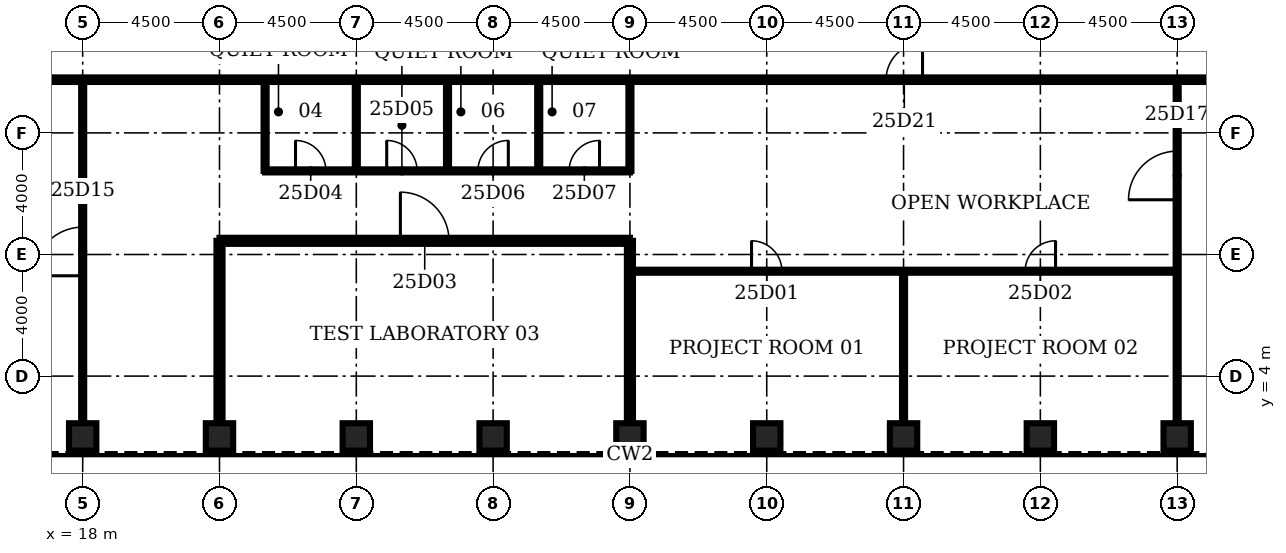
"""IFC4 building model, lengths in metres.
Left out: names, types, materials, properties, quantities, classifications, styles, units other than length and angle.
Written with IfcOpenShell. Run it as: python <this file> out.ifc"""

import sys

from ifc_helpers import new_model, si_unit, direction, frame, frame_2d, origin, origin_2d, place, context, subcontext, project, spatial, rectangle, hollow_rectangle, extrude, element, fill, save


model = new_model("IFC4")
c1 = context("Model", 3, precision=1e-05, world=origin(), true_north=direction((0.0, 1.0)))
c2 = subcontext(c1, "Body", "Model", "MODEL_VIEW")
j1 = project(units=[si_unit("LENGTHUNIT", "METRE"), si_unit("PLANEANGLEUNIT", "RADIAN")], contexts=[c1])
p1 = place(None, origin())
s1 = spatial("IfcSite", under=j1, at=p1, CompositionType="ELEMENT")
p2 = place(p1, origin())
s2 = spatial("IfcBuilding", under=s1, at=p2, CompositionType="ELEMENT")
p3 = place(p2, frame((0.0, 0.0, 117.3)))
s3 = spatial("IfcBuildingStorey", under=s2, at=p3, CompositionType="ELEMENT", Elevation=117.3)
for number, where, z_axis, x_axis in (
    (1, (18.0, 2.0, 0.0), (0.0, 0.0, 1.0), (0.0, 1.0, 0.0)),
    (2, (22.5, 2.0, 0.0), (0.0, 0.0, 1.0), (0.0, 1.0, 0.0)),
    (3, (27.0, 2.0, 0.0), (0.0, 0.0, 1.0), (0.0, 1.0, 0.0)),
    (4, (31.5, 2.0, 0.0), (0.0, 0.0, 1.0), (0.0, 1.0, 0.0)),
    (5, (36.0, 2.0, 0.0), (0.0, 0.0, 1.0), (0.0, 1.0, 0.0)),
    (6, (40.5, 2.0, 0.0), (0.0, 0.0, 1.0), (0.0, 1.0, 0.0)),
    (7, (45.0, 2.0, 0.0), (0.0, 0.0, 1.0), (0.0, 1.0, 0.0)),
    (8, (49.5, 2.0, 0.0), (0.0, 0.0, 1.0), (0.0, 1.0, 0.0)),
    (9, (54.0, 2.0, 0.0), (0.0, 0.0, 1.0), (0.0, 1.0, 0.0)),
):
    element("IfcColumn", number, at=place(p3, frame(where, z_axis=z_axis, x_axis=x_axis)), inside=s3, PredefinedType="COLUMN", context=c2, shape_type="SweptSolid", body=[
        extrude(hollow_rectangle(XDim=0.9, YDim=0.9, WallThickness=0.11, at=origin_2d()), origin(), (0.0, 0.0, 1.0), 4.2),
    ])
p4 = place(p3, frame((36.0, 7.45, 0.0), z_axis=(0.0, 0.0, 1.0), x_axis=(1.0, 0.0, 0.0)))
e10 = element("IfcWall", 10, at=p4, inside=s3, PredefinedType="PARTITIONING", context=c2, shape_type="SweptSolid", body=[
    extrude(rectangle(XDim=18.0, YDim=0.1, at=frame_2d((9.0, 0.0))), origin(), (0.0, 0.0, 1.0), 3.0),
])
p5 = place(p4, frame((4.0, 0.0, 0.0)))
e11 = element("IfcOpeningElement", 11, at=p5, cuts=e10, PredefinedType="OPENING", context=c2, shape_type="SweptSolid", body=[
    extrude(rectangle(XDim=1.0, YDim=2.1, at=frame_2d((0.5, 1.05))), frame((0.0, 0.06, 0.0), z_axis=(0.0, -1.0, 0.0), x_axis=(1.0, 0.0, 0.0)), (0.0, 0.0, 1.0), 0.12),
])
p6 = place(p4, frame((13.0, 0.0, 0.0)))
e12 = element("IfcOpeningElement", 12, at=p6, cuts=e10, PredefinedType="OPENING", context=c2, shape_type="SweptSolid", body=[
    extrude(rectangle(XDim=1.0, YDim=2.1, at=frame_2d((0.5, 1.05))), frame((0.0, 0.06, 0.0), z_axis=(0.0, -1.0, 0.0), x_axis=(1.0, 0.0, 0.0)), (0.0, 0.0, 1.0), 0.12),
])
p7 = place(p3, frame((22.5, 8.45, 0.0), z_axis=(0.0, 0.0, 1.0), x_axis=(1.0, 0.0, 0.0)))
e13 = element("IfcWall", 13, at=p7, inside=s3, PredefinedType="PARTITIONING", context=c2, shape_type="SweptSolid", body=[
    extrude(rectangle(XDim=13.5, YDim=0.2, at=frame_2d((6.75, 0.0))), origin(), (0.0, 0.0, 1.0), 3.0),
])
p8 = place(p7, frame((5.95, 0.0, 0.0)))
e14 = element("IfcOpeningElement", 14, at=p8, cuts=e13, PredefinedType="OPENING", context=c2, shape_type="SweptSolid", body=[
    extrude(rectangle(XDim=1.6, YDim=2.1, at=frame_2d((0.8, 1.05))), frame((0.0, 0.11, 0.0), z_axis=(0.0, -1.0, 0.0), x_axis=(1.0, 0.0, 0.0)), (0.0, 0.0, 1.0), 0.22),
])
p9 = place(p3, frame((24.0, 10.75, 0.0), z_axis=(0.0, 0.0, 1.0), x_axis=(1.0, 0.0, 0.0)))
e15 = element("IfcWall", 15, at=p9, inside=s3, PredefinedType="PARTITIONING", context=c2, shape_type="SweptSolid", body=[
    extrude(rectangle(XDim=12.0, YDim=0.1, at=frame_2d((6.0, 0.0))), origin(), (0.0, 0.0, 1.0), 3.0),
])
p10 = place(p9, frame((1.0, 0.0, 0.0)))
e16 = element("IfcOpeningElement", 16, at=p10, cuts=e15, PredefinedType="OPENING", context=c2, shape_type="SweptSolid", body=[
    extrude(rectangle(XDim=1.0, YDim=2.1, at=frame_2d((0.5, 1.05))), frame((0.0, 0.06, 0.0), z_axis=(0.0, -1.0, 0.0), x_axis=(1.0, 0.0, 0.0)), (0.0, 0.0, 1.0), 0.12),
])
p11 = place(p9, frame((4.0, 0.0, 0.0)))
e17 = element("IfcOpeningElement", 17, at=p11, cuts=e15, PredefinedType="OPENING", context=c2, shape_type="SweptSolid", body=[
    extrude(rectangle(XDim=1.0, YDim=2.1, at=frame_2d((0.5, 1.05))), frame((0.0, 0.06, 0.0), z_axis=(0.0, -1.0, 0.0), x_axis=(1.0, 0.0, 0.0)), (0.0, 0.0, 1.0), 0.12),
])
p12 = place(p9, frame((7.0, 0.0, 0.0)))
e18 = element("IfcOpeningElement", 18, at=p12, cuts=e15, PredefinedType="OPENING", context=c2, shape_type="SweptSolid", body=[
    extrude(rectangle(XDim=1.0, YDim=2.1, at=frame_2d((0.5, 1.05))), frame((0.0, 0.06, 0.0), z_axis=(0.0, -1.0, 0.0), x_axis=(1.0, 0.0, 0.0)), (0.0, 0.0, 1.0), 0.12),
])
p13 = place(p9, frame((10.0, 0.0, 0.0)))
e19 = element("IfcOpeningElement", 19, at=p13, cuts=e15, PredefinedType="OPENING", context=c2, shape_type="SweptSolid", body=[
    extrude(rectangle(XDim=1.0, YDim=2.1, at=frame_2d((0.5, 1.05))), frame((0.0, 0.06, 0.0), z_axis=(0.0, -1.0, 0.0), x_axis=(1.0, 0.0, 0.0)), (0.0, 0.0, 1.0), 0.12),
])
p14 = place(p3, frame((15.15, 13.75, 0.0), z_axis=(0.0, 0.0, 1.0), x_axis=(1.0, 0.0, 0.0)))
e20 = element("IfcWall", 20, at=p14, inside=s3, PredefinedType="PARTITIONING", context=c2, shape_type="SweptSolid", body=[
    extrude(rectangle(XDim=41.7, YDim=0.15, at=frame_2d((20.85, 0.0))), origin(), (0.0, 0.0, 1.0), 3.0),
])
p15 = place(p14, frame((29.275, 0.0, 0.0)))
e21 = element("IfcOpeningElement", 21, at=p15, cuts=e20, PredefinedType="OPENING", context=c2, shape_type="SweptSolid", body=[
    extrude(rectangle(XDim=1.2, YDim=2.1, at=frame_2d((0.6, 1.05))), frame((0.0, 0.085, 0.0), z_axis=(0.0, -1.0, 0.0), x_axis=(1.0, 0.0, 0.0)), (0.0, 0.0, 1.0), 0.17),
])
p16 = place(p3, frame((18.0, 2.45, 0.0), z_axis=(0.0, 0.0, 1.0), x_axis=(0.0, 1.0, 0.0)))
e22 = element("IfcWall", 22, at=p16, inside=s3, PredefinedType="PARTITIONING", context=c2, shape_type="SweptSolid", body=[
    extrude(rectangle(XDim=11.3, YDim=0.1, at=frame_2d((5.65, 0.0))), origin(), (0.0, 0.0, 1.0), 3.0),
])
p17 = place(p16, frame((4.85, 0.0, 0.0)))
e23 = element("IfcOpeningElement", 23, at=p17, cuts=e22, PredefinedType="OPENING", context=c2, shape_type="SweptSolid", body=[
    extrude(rectangle(XDim=1.6, YDim=2.1, at=frame_2d((0.8, 1.05))), frame((0.0, 0.06, 0.0), z_axis=(0.0, -1.0, 0.0), x_axis=(1.0, 0.0, 0.0)), (0.0, 0.0, 1.0), 0.12),
])
p18 = place(p3, frame((22.5, 2.45, 0.0), z_axis=(0.0, 0.0, 1.0), x_axis=(0.0, 1.0, 0.0)))
e24 = element("IfcWall", 24, at=p18, inside=s3, PredefinedType="PARTITIONING", context=c2, shape_type="SweptSolid", body=[
    extrude(rectangle(XDim=6.0, YDim=0.2, at=frame_2d((3.0, 0.0))), origin(), (0.0, 0.0, 1.0), 3.0),
])
for number, where, z_axis, x_axis in (
    (25, (24.0, 10.75, 0.0), (0.0, 0.0, 1.0), (0.0, 1.0, 0.0)),
    (26, (27.0, 10.75, 0.0), (0.0, 0.0, 1.0), (0.0, 1.0, 0.0)),
    (27, (30.0, 10.75, 0.0), (0.0, 0.0, 1.0), (0.0, 1.0, 0.0)),
    (28, (33.0, 10.75, 0.0), (0.0, 0.0, 1.0), (0.0, 1.0, 0.0)),
):
    element("IfcWall", number, at=place(p3, frame(where, z_axis=z_axis, x_axis=x_axis)), inside=s3, PredefinedType="PARTITIONING", context=c2, shape_type="SweptSolid", body=[
        extrude(rectangle(XDim=3.0, YDim=0.1, at=frame_2d((1.5, 0.0))), origin(), (0.0, 0.0, 1.0), 3.0),
    ])
p19 = place(p3, frame((36.0, 2.45, 0.0), z_axis=(0.0, 0.0, 1.0), x_axis=(0.0, 1.0, 0.0)))
e29 = element("IfcWall", 29, at=p19, inside=s3, PredefinedType="PARTITIONING", context=c2, shape_type="SweptSolid", body=[
    extrude(rectangle(XDim=6.0, YDim=0.2, at=frame_2d((3.0, 0.0))), origin(), (0.0, 0.0, 1.0), 3.0),
])
p20 = place(p3, frame((36.0, 10.75, 0.0), z_axis=(0.0, 0.0, 1.0), x_axis=(0.0, 1.0, 0.0)))
e30 = element("IfcWall", 30, at=p20, inside=s3, PredefinedType="PARTITIONING", context=c2, shape_type="SweptSolid", body=[
    extrude(rectangle(XDim=3.0, YDim=0.1, at=frame_2d((1.5, 0.0))), origin(), (0.0, 0.0, 1.0), 3.0),
])
p21 = place(p3, frame((45.0, 2.45, 0.0), z_axis=(0.0, 0.0, 1.0), x_axis=(0.0, 1.0, 0.0)))
e31 = element("IfcWall", 31, at=p21, inside=s3, PredefinedType="PARTITIONING", context=c2, shape_type="SweptSolid", body=[
    extrude(rectangle(XDim=5.0, YDim=0.1, at=frame_2d((2.5, 0.0))), origin(), (0.0, 0.0, 1.0), 3.0),
])
p22 = place(p3, frame((54.0, 2.45, 0.0), z_axis=(0.0, 0.0, 1.0), x_axis=(0.0, 1.0, 0.0)))
e32 = element("IfcWall", 32, at=p22, inside=s3, PredefinedType="PARTITIONING", context=c2, shape_type="SweptSolid", body=[
    extrude(rectangle(XDim=11.3, YDim=0.1, at=frame_2d((5.65, 0.0))), origin(), (0.0, 0.0, 1.0), 3.0),
])
p23 = place(p22, frame((7.35, 0.0, 0.0)))
e33 = element("IfcOpeningElement", 33, at=p23, cuts=e32, PredefinedType="OPENING", context=c2, shape_type="SweptSolid", body=[
    extrude(rectangle(XDim=1.6, YDim=2.1, at=frame_2d((0.8, 1.05))), frame((0.0, 0.06, 0.0), z_axis=(0.0, -1.0, 0.0), x_axis=(1.0, 0.0, 0.0)), (0.0, 0.0, 1.0), 0.12),
])
p24 = place(p5, origin())
e34 = element("IfcDoor", 34, at=p24, inside=s3, OperationType="SINGLE_SWING_LEFT", PredefinedType="DOOR", context=c2, shape_type="SweptSolid", body=[
    extrude(rectangle(XDim=1.0, YDim=2.1, at=frame_2d((0.5, 1.05))), frame((0.0, 0.025, 0.0), z_axis=(0.0, -1.0, 0.0), x_axis=(1.0, 0.0, 0.0)), (0.0, 0.0, 1.0), 0.05),
])
fill(e11, e34)
p25 = place(p6, origin())
e35 = element("IfcDoor", 35, at=p25, inside=s3, OperationType="SINGLE_SWING_RIGHT", PredefinedType="DOOR", context=c2, shape_type="SweptSolid", body=[
    extrude(rectangle(XDim=1.0, YDim=2.1, at=frame_2d((0.5, 1.05))), frame((0.0, 0.025, 0.0), z_axis=(0.0, -1.0, 0.0), x_axis=(1.0, 0.0, 0.0)), (0.0, 0.0, 1.0), 0.05),
])
fill(e12, e35)
p26 = place(p8, origin())
e36 = element("IfcDoor", 36, at=p26, inside=s3, OperationType="SINGLE_SWING_LEFT", PredefinedType="DOOR", context=c2, shape_type="SweptSolid", body=[
    extrude(rectangle(XDim=1.6, YDim=2.1, at=frame_2d((0.8, 1.05))), frame((0.0, 0.025, 0.0), z_axis=(0.0, -1.0, 0.0), x_axis=(1.0, 0.0, 0.0)), (0.0, 0.0, 1.0), 0.05),
])
fill(e14, e36)
p27 = place(p10, origin())
e37 = element("IfcDoor", 37, at=p27, inside=s3, OperationType="SINGLE_SWING_LEFT", PredefinedType="DOOR", context=c2, shape_type="SweptSolid", body=[
    extrude(rectangle(XDim=1.0, YDim=2.1, at=frame_2d((0.5, 1.05))), frame((0.0, 0.025, 0.0), z_axis=(0.0, -1.0, 0.0), x_axis=(1.0, 0.0, 0.0)), (0.0, 0.0, 1.0), 0.05),
])
fill(e16, e37)
p28 = place(p11, origin())
e38 = element("IfcDoor", 38, at=p28, inside=s3, OperationType="SINGLE_SWING_LEFT", PredefinedType="DOOR", context=c2, shape_type="SweptSolid", body=[
    extrude(rectangle(XDim=1.0, YDim=2.1, at=frame_2d((0.5, 1.05))), frame((0.0, 0.025, 0.0), z_axis=(0.0, -1.0, 0.0), x_axis=(1.0, 0.0, 0.0)), (0.0, 0.0, 1.0), 0.05),
])
fill(e17, e38)
p29 = place(p12, origin())
e39 = element("IfcDoor", 39, at=p29, inside=s3, OperationType="SINGLE_SWING_RIGHT", PredefinedType="DOOR", context=c2, shape_type="SweptSolid", body=[
    extrude(rectangle(XDim=1.0, YDim=2.1, at=frame_2d((0.5, 1.05))), frame((0.0, 0.025, 0.0), z_axis=(0.0, -1.0, 0.0), x_axis=(1.0, 0.0, 0.0)), (0.0, 0.0, 1.0), 0.05),
])
fill(e18, e39)
p30 = place(p13, origin())
e40 = element("IfcDoor", 40, at=p30, inside=s3, OperationType="SINGLE_SWING_RIGHT", PredefinedType="DOOR", context=c2, shape_type="SweptSolid", body=[
    extrude(rectangle(XDim=1.0, YDim=2.1, at=frame_2d((0.5, 1.05))), frame((0.0, 0.025, 0.0), z_axis=(0.0, -1.0, 0.0), x_axis=(1.0, 0.0, 0.0)), (0.0, 0.0, 1.0), 0.05),
])
fill(e19, e40)
p31 = place(p17, origin())
e41 = element("IfcDoor", 41, at=p31, inside=s3, OperationType="SINGLE_SWING_LEFT", PredefinedType="DOOR", context=c2, shape_type="SweptSolid", body=[
    extrude(rectangle(XDim=1.6, YDim=2.1, at=frame_2d((0.8, 1.05))), frame((0.0, 0.025, 0.0), z_axis=(0.0, -1.0, 0.0), x_axis=(1.0, 0.0, 0.0)), (0.0, 0.0, 1.0), 0.05),
])
fill(e23, e41)
p32 = place(p23, origin())
e42 = element("IfcDoor", 42, at=p32, inside=s3, OperationType="SINGLE_SWING_LEFT", PredefinedType="DOOR", context=c2, shape_type="SweptSolid", body=[
    extrude(rectangle(XDim=1.6, YDim=2.1, at=frame_2d((0.8, 1.05))), frame((0.0, 0.025, 0.0), z_axis=(0.0, -1.0, 0.0), x_axis=(1.0, 0.0, 0.0)), (0.0, 0.0, 1.0), 0.05),
])
fill(e33, e42)
p33 = place(p15, origin())
e43 = element("IfcDoor", 43, at=p33, inside=s3, OperationType="SINGLE_SWING_RIGHT", PredefinedType="DOOR", context=c2, shape_type="SweptSolid", body=[
    extrude(rectangle(XDim=1.2, YDim=2.1, at=frame_2d((0.6, 1.05))), frame((0.0, 0.025, 0.0), z_axis=(0.0, -1.0, 0.0), x_axis=(1.0, 0.0, 0.0)), (0.0, 0.0, 1.0), 0.05),
])
fill(e21, e43)
save(model, sys.argv[1])
